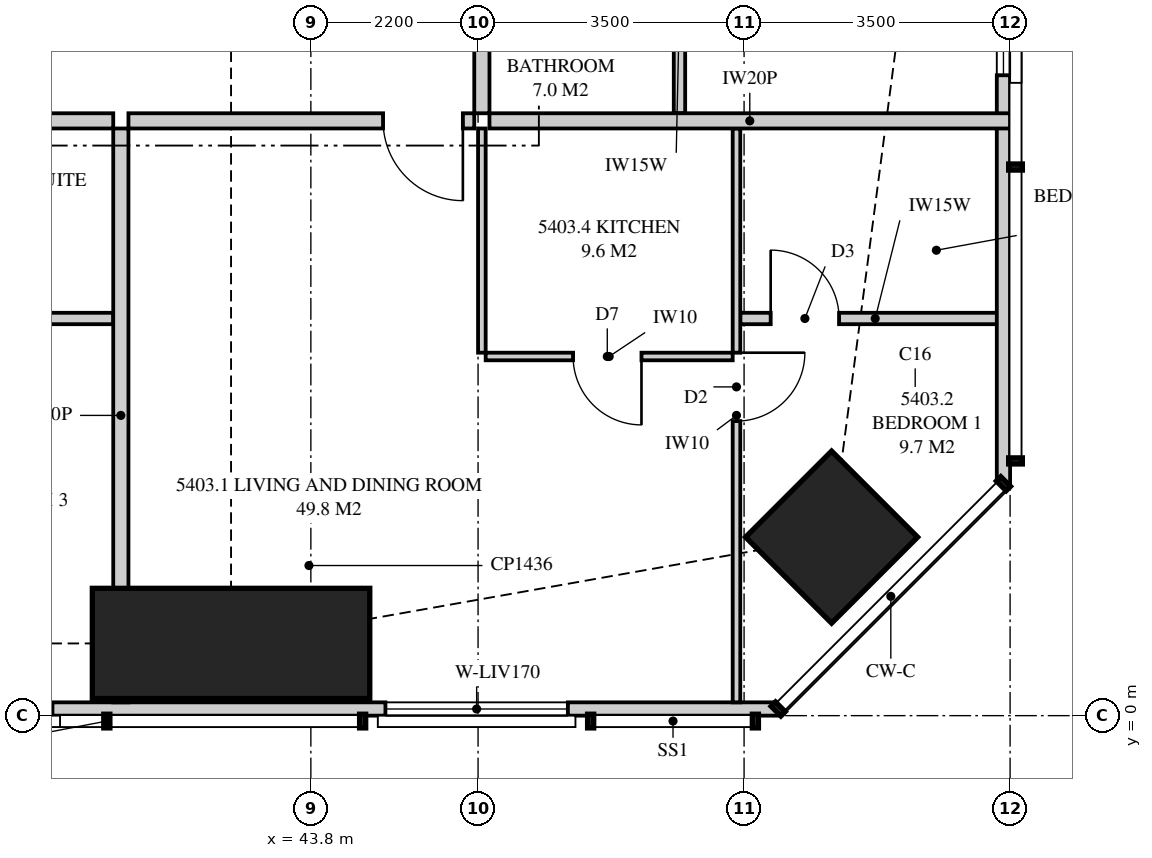
"""IFC4 building model, lengths in metres.
Left out: names, types, materials, properties, quantities, classifications, styles, units other than length and angle.
Written with IfcOpenShell. Run it as: python <this file> out.ifc"""

import sys

from ifc_helpers import new_model, si_unit, direction, frame, frame_2d, origin, origin_2d, place, context, subcontext, project, spatial, polyline, rectangle, outline, extrude, element, fill, save


model = new_model("IFC4")
c1 = context("Model", 3, precision=1e-05, world=origin(), true_north=direction((0.0, 1.0)))
c2 = subcontext(c1, "Body", "Model", "MODEL_VIEW")
j1 = project(units=[si_unit("LENGTHUNIT", "METRE"), si_unit("PLANEANGLEUNIT", "RADIAN")], contexts=[c1])
p1 = place(None, origin())
s1 = spatial("IfcSite", under=j1, at=p1, CompositionType="ELEMENT")
p2 = place(p1, origin())
s2 = spatial("IfcBuilding", under=s1, at=p2, CompositionType="ELEMENT")
p3 = place(p2, frame((0.0, 0.0, 197.9)))
s3 = spatial("IfcBuildingStorey", under=s2, at=p3, CompositionType="ELEMENT", Elevation=197.9)
p4 = place(p3, frame((42.75, 0.95, 0.0), z_axis=(0.0, 0.0, 1.0), x_axis=(0.0, 1.0, 0.0)))
e1 = element("IfcColumn", 1, at=p4, inside=s3, PredefinedType="COLUMN", context=c2, shape_type="SweptSolid", body=[
    extrude(rectangle(XDim=1.45, YDim=3.65, at=origin_2d()), origin(), (0.0, 0.0, 1.0), 3.35),
])
p5 = place(p3, frame((50.652, 2.348, 0.0), z_axis=(0.0, 0.0, 1.0), x_axis=(0.707106781187, 0.707106781187, 0.0)))
e2 = element("IfcColumn", 2, at=p5, inside=s3, PredefinedType="COLUMN", context=c2, shape_type="SweptSolid", body=[
    extrude(rectangle(XDim=1.6, YDim=1.6, at=origin_2d()), origin(), (0.0, 0.0, 1.0), 3.35),
])
p6 = place(p3, frame((15.051, 0.087, 0.0), z_axis=(0.0, 0.0, 1.0), x_axis=(1.0, 0.0, 0.0)))
e3 = element("IfcWall", 3, at=p6, inside=s3, PredefinedType="SOLIDWALL", context=c2, shape_type="SweptSolid", body=[
    extrude(outline(polyline([(0.0, 0.0), (34.897, 0.0), (34.897, 3.11), (27.91, 3.11), (27.91, 2.15), (27.836, 2.15), (27.836, 3.11), (27.699, 3.11), (27.699, 2.15), (7.199, 2.15), (7.199, 3.11), (7.062, 3.11), (7.062, 2.15), (6.987, 2.15), (6.987, 3.11), (0.0, 3.11), (0.0, 0.0)])), frame((0.0, 0.087, 0.0), z_axis=(0.0, -1.0, 0.0), x_axis=(1.0, 0.0, 0.0)), (0.0, 0.0, 1.0), 0.175),
])
p7 = place(p6, frame((0.613, 0.0, 0.4)))
e4 = element("IfcOpeningElement", 4, at=p7, cuts=e3, PredefinedType="OPENING", context=c2, shape_type="SweptSolid", body=[
    extrude(rectangle(XDim=1.2, YDim=1.7, at=frame_2d((0.6, 0.85))), frame((0.0, 0.097, 0.0), z_axis=(0.0, -1.0, 0.0), x_axis=(1.0, 0.0, 0.0)), (0.0, 0.0, 1.0), 0.195),
])
p8 = place(p6, frame((3.349, 0.0, 0.4)))
e5 = element("IfcOpeningElement", 5, at=p8, cuts=e3, PredefinedType="OPENING", context=c2, shape_type="SweptSolid", body=[
    extrude(rectangle(XDim=1.8, YDim=1.7, at=frame_2d((0.9, 0.85))), frame((0.0, 0.097, 0.0), z_axis=(0.0, -1.0, 0.0), x_axis=(1.0, 0.0, 0.0)), (0.0, 0.0, 1.0), 0.195),
])
p9 = place(p6, frame((9.13, 0.0, 0.4)))
e6 = element("IfcOpeningElement", 6, at=p9, cuts=e3, PredefinedType="OPENING", context=c2, shape_type="SweptSolid", body=[
    extrude(rectangle(XDim=1.8, YDim=1.7, at=frame_2d((0.9, 0.85))), frame((0.0, 0.097, 0.0), z_axis=(0.0, -1.0, 0.0), x_axis=(1.0, 0.0, 0.0)), (0.0, 0.0, 1.0), 0.195),
])
p10 = place(p6, frame((13.561, 0.0, 0.0)))
e7 = element("IfcOpeningElement", 7, at=p10, cuts=e3, PredefinedType="OPENING", context=c2, shape_type="SweptSolid", body=[
    extrude(rectangle(XDim=1.8, YDim=2.1, at=frame_2d((0.9, 1.05))), frame((0.0, 0.097, 0.0), z_axis=(0.0, -1.0, 0.0), x_axis=(1.0, 0.0, 0.0)), (0.0, 0.0, 1.0), 0.195),
])
p11 = place(p6, frame((11.799, 0.0, 0.4)))
e8 = element("IfcOpeningElement", 8, at=p11, cuts=e3, PredefinedType="OPENING", context=c2, shape_type="SweptSolid", body=[
    extrude(rectangle(XDim=1.2, YDim=1.7, at=frame_2d((0.6, 0.85))), frame((0.0, 0.097, 0.0), z_axis=(0.0, -1.0, 0.0), x_axis=(1.0, 0.0, 0.0)), (0.0, 0.0, 1.0), 0.195),
])
p12 = place(p6, frame((19.949, 0.0, 0.4)))
e9 = element("IfcOpeningElement", 9, at=p12, cuts=e3, PredefinedType="OPENING", context=c2, shape_type="SweptSolid", body=[
    extrude(rectangle(XDim=1.8, YDim=1.7, at=frame_2d((0.9, 0.85))), frame((0.0, 0.097, 0.0), z_axis=(0.0, -1.0, 0.0), x_axis=(1.0, 0.0, 0.0)), (0.0, 0.0, 1.0), 0.195),
])
p13 = place(p6, frame((23.549, 0.0, 0.4)))
e10 = element("IfcOpeningElement", 10, at=p13, cuts=e3, PredefinedType="OPENING", context=c2, shape_type="SweptSolid", body=[
    extrude(rectangle(XDim=1.8, YDim=1.7, at=frame_2d((0.9, 0.85))), frame((0.0, 0.097, 0.0), z_axis=(0.0, -1.0, 0.0), x_axis=(1.0, 0.0, 0.0)), (0.0, 0.0, 1.0), 0.195),
])
p14 = place(p6, frame((29.73, 0.0, 0.4)))
e11 = element("IfcOpeningElement", 11, at=p14, cuts=e3, PredefinedType="OPENING", context=c2, shape_type="SweptSolid", body=[
    extrude(rectangle(XDim=2.4, YDim=1.7, at=frame_2d((1.2, 0.85))), frame((0.0, 0.097, 0.0), z_axis=(0.0, -1.0, 0.0), x_axis=(1.0, 0.0, 0.0)), (0.0, 0.0, 1.0), 0.195),
])
p15 = place(p3, frame((52.913, 3.051, 0.0), z_axis=(0.0, 0.0, 1.0), x_axis=(0.0, 1.0, 0.0)))
e12 = element("IfcWall", 12, at=p15, inside=s3, PredefinedType="SOLIDWALL", context=c2, shape_type="SweptSolid", body=[
    extrude(outline(polyline([(0.0, 0.0), (29.897, 0.0), (29.897, 3.11), (22.167, 3.11), (22.167, 2.15), (22.074, 2.15), (22.074, 3.11), (21.949, 3.11), (21.949, 2.15), (9.949, 2.15), (9.949, 3.11), (9.847, 3.11), (9.847, 2.15), (9.706, 2.15), (9.706, 3.11), (0.0, 3.11), (0.0, 0.0)])), frame((0.0, 0.087, 0.0), z_axis=(0.0, -1.0, 0.0), x_axis=(1.0, 0.0, 0.0)), (0.0, 0.0, 1.0), 0.175),
])
p16 = place(p15, frame((5.374, 0.0, 0.4)))
e13 = element("IfcOpeningElement", 13, at=p16, cuts=e12, PredefinedType="OPENING", context=c2, shape_type="SweptSolid", body=[
    extrude(rectangle(XDim=1.8, YDim=1.7, at=frame_2d((0.9, 0.85))), frame((0.0, 0.097, 0.0), z_axis=(0.0, -1.0, 0.0), x_axis=(1.0, 0.0, 0.0)), (0.0, 0.0, 1.0), 0.195),
])
p17 = place(p15, frame((12.199, 0.0, 0.4)))
e14 = element("IfcOpeningElement", 14, at=p17, cuts=e12, PredefinedType="OPENING", context=c2, shape_type="SweptSolid", body=[
    extrude(rectangle(XDim=1.8, YDim=1.7, at=frame_2d((0.9, 0.85))), frame((0.0, 0.097, 0.0), z_axis=(0.0, -1.0, 0.0), x_axis=(1.0, 0.0, 0.0)), (0.0, 0.0, 1.0), 0.195),
])
p18 = place(p15, frame((15.324, 0.0, 0.0)))
e15 = element("IfcOpeningElement", 15, at=p18, cuts=e12, PredefinedType="OPENING", context=c2, shape_type="SweptSolid", body=[
    extrude(rectangle(XDim=1.8, YDim=2.1, at=frame_2d((0.9, 1.05))), frame((0.0, 0.097, 0.0), z_axis=(0.0, -1.0, 0.0), x_axis=(1.0, 0.0, 0.0)), (0.0, 0.0, 1.0), 0.195),
])
p19 = place(p15, frame((18.174, 0.0, 0.4)))
e16 = element("IfcOpeningElement", 16, at=p19, cuts=e12, PredefinedType="OPENING", context=c2, shape_type="SweptSolid", body=[
    extrude(rectangle(XDim=1.8, YDim=1.7, at=frame_2d((0.9, 0.85))), frame((0.0, 0.097, 0.0), z_axis=(0.0, -1.0, 0.0), x_axis=(1.0, 0.0, 0.0)), (0.0, 0.0, 1.0), 0.195),
])
p20 = place(p15, frame((23.886, 0.0, 0.4)))
e17 = element("IfcOpeningElement", 17, at=p20, cuts=e12, PredefinedType="OPENING", context=c2, shape_type="SweptSolid", body=[
    extrude(rectangle(XDim=1.8, YDim=1.7, at=frame_2d((0.9, 0.85))), frame((0.0, 0.097, 0.0), z_axis=(0.0, -1.0, 0.0), x_axis=(1.0, 0.0, 0.0)), (0.0, 0.0, 1.0), 0.195),
])
p21 = place(p15, frame((26.871, 0.0, 0.4)))
e18 = element("IfcOpeningElement", 18, at=p21, cuts=e12, PredefinedType="OPENING", context=c2, shape_type="SweptSolid", body=[
    extrude(rectangle(XDim=1.8, YDim=1.7, at=frame_2d((0.9, 0.85))), frame((0.0, 0.097, 0.0), z_axis=(0.0, -1.0, 0.0), x_axis=(1.0, 0.0, 0.0)), (0.0, 0.0, 1.0), 0.195),
])
p22 = place(p3, frame((41.3, 0.175, 0.0), z_axis=(0.0, 0.0, 1.0), x_axis=(0.0, 1.0, 0.0)))
e19 = element("IfcWall", 19, at=p22, inside=s3, PredefinedType="PARTITIONING", context=c2, shape_type="SweptSolid", body=[
    extrude(outline(polyline([(0.529, 2.15), (0.0, 2.15), (0.0, 0.0), (0.529, 0.0), (0.529, 0.032), (1.021, 0.032), (1.021, 0.0), (7.55, 0.0), (7.55, 3.11), (1.685, 3.11), (1.685, 2.15), (1.021, 2.15), (1.021, 2.118), (0.529, 2.118), (0.529, 2.15)])), frame((0.0, 0.1, 0.0), z_axis=(0.0, -1.0, 0.0), x_axis=(1.0, 0.0, 0.0)), (0.0, 0.0, 1.0), 0.2),
])
p23 = place(p3, frame((37.75, 5.225, 0.0), z_axis=(0.0, 0.0, 1.0), x_axis=(1.0, 0.0, 0.0)))
e20 = element("IfcWall", 20, at=p23, inside=s3, PredefinedType="PLUMBINGWALL", context=c2, shape_type="SweptSolid", body=[
    extrude(rectangle(XDim=3.45, YDim=0.15, at=frame_2d((1.725, 0.0))), origin(), (0.0, 0.0, 1.0), 3.11),
])
p24 = place(p23, frame((0.4, 0.0, 0.0)))
e21 = element("IfcOpeningElement", 21, at=p24, cuts=e20, PredefinedType="OPENING", context=c2, shape_type="SweptSolid", body=[
    extrude(rectangle(XDim=0.9, YDim=2.1, at=frame_2d((0.45, 1.05))), frame((0.0, 0.085, 0.0), z_axis=(0.0, -1.0, 0.0), x_axis=(1.0, 0.0, 0.0)), (0.0, 0.0, 1.0), 0.17),
])
p25 = place(p3, frame((41.4, 7.825, 0.0), z_axis=(0.0, 0.0, 1.0), x_axis=(1.0, 0.0, 0.0)))
e22 = element("IfcWall", 22, at=p25, inside=s3, PredefinedType="PARTITIONING", context=c2, shape_type="SweptSolid", body=[
    extrude(outline(polyline([(0.0, 0.0), (4.55, 0.0), (4.55, 3.11), (1.688, 3.11), (1.688, 2.541), (1.013, 2.541), (1.013, 3.11), (0.0, 3.11), (0.0, 0.0)])), frame((0.0, 0.1, 0.0), z_axis=(0.0, -1.0, 0.0), x_axis=(1.0, 0.0, 0.0)), (0.0, 0.0, 1.0), 0.2),
])
p26 = place(p25, frame((3.35, 0.0, 0.0)))
e23 = element("IfcOpeningElement", 23, at=p26, cuts=e22, PredefinedType="OPENING", context=c2, shape_type="SweptSolid", body=[
    extrude(rectangle(XDim=1.05, YDim=2.2, at=frame_2d((0.525, 1.1))), frame((0.0, 0.11, 0.0), z_axis=(0.0, -1.0, 0.0), x_axis=(1.0, 0.0, 0.0)), (0.0, 0.0, 1.0), 0.22),
])
p27 = place(p3, frame((49.4, 0.175, 0.0), z_axis=(0.0, 0.0, 1.0), x_axis=(0.0, 1.0, 0.0)))
e24 = element("IfcWall", 24, at=p27, inside=s3, PredefinedType="PARTITIONING", context=c2, shape_type="SweptSolid", body=[
    extrude(outline(polyline([(0.0, 0.0), (7.55, 0.0), (7.55, 3.11), (2.825, 3.11), (2.825, 2.15), (1.079, 2.15), (1.079, 3.11), (0.0, 3.11), (0.0, 0.0)])), frame((0.0, 0.05, 0.0), z_axis=(0.0, -1.0, 0.0), x_axis=(1.0, 0.0, 0.0)), (0.0, 0.0, 1.0), 0.1),
])
p28 = place(p27, frame((3.7, 0.0, 0.0)))
e25 = element("IfcOpeningElement", 25, at=p28, cuts=e24, PredefinedType="OPENING", context=c2, shape_type="SweptSolid", body=[
    extrude(rectangle(XDim=0.9, YDim=2.1, at=frame_2d((0.45, 1.05))), frame((0.0, 0.06, 0.0), z_axis=(0.0, -1.0, 0.0), x_axis=(1.0, 0.0, 0.0)), (0.0, 0.0, 1.0), 0.12),
])
p29 = place(p3, frame((49.45, 5.225, 0.0), z_axis=(0.0, 0.0, 1.0), x_axis=(1.0, 0.0, 0.0)))
e26 = element("IfcWall", 26, at=p29, inside=s3, PredefinedType="PLUMBINGWALL", context=c2, shape_type="SweptSolid", body=[
    extrude(outline(polyline([(0.0, 0.0), (3.55, 0.0), (3.55, 3.11), (2.472, 3.11), (2.472, 2.15), (0.687, 2.15), (0.687, 3.11), (0.0, 3.11), (0.0, 0.0)])), frame((0.0, 0.075, 0.0), z_axis=(0.0, -1.0, 0.0), x_axis=(1.0, 0.0, 0.0)), (0.0, 0.0, 1.0), 0.15),
])
p30 = place(p29, frame((0.4, 0.0, 0.0)))
e27 = element("IfcOpeningElement", 27, at=p30, cuts=e26, PredefinedType="OPENING", context=c2, shape_type="SweptSolid", body=[
    extrude(rectangle(XDim=0.9, YDim=2.1, at=frame_2d((0.45, 1.05))), frame((0.0, 0.085, 0.0), z_axis=(0.0, -1.0, 0.0), x_axis=(1.0, 0.0, 0.0)), (0.0, 0.0, 1.0), 0.17),
])
p31 = place(p3, frame((46.1, 4.725, 0.0), z_axis=(0.0, 0.0, 1.0), x_axis=(1.0, 0.0, 0.0)))
e28 = element("IfcWall", 28, at=p31, inside=s3, PredefinedType="PARTITIONING", context=c2, shape_type="SweptSolid", body=[
    extrude(rectangle(XDim=3.25, YDim=0.1, at=frame_2d((1.625, 0.0))), origin(), (0.0, 0.0, 1.0), 3.11),
])
p32 = place(p31, frame((1.15, 0.0, 0.0)))
e29 = element("IfcOpeningElement", 29, at=p32, cuts=e28, PredefinedType="OPENING", context=c2, shape_type="SweptSolid", body=[
    extrude(rectangle(XDim=0.9, YDim=2.1, at=frame_2d((0.45, 1.05))), frame((0.0, 0.06, 0.0), z_axis=(0.0, -1.0, 0.0), x_axis=(1.0, 0.0, 0.0)), (0.0, 0.0, 1.0), 0.12),
])
p33 = place(p3, frame((46.05, 4.775, 0.0), z_axis=(0.0, 0.0, 1.0), x_axis=(0.0, 1.0, 0.0)))
e30 = element("IfcWall", 30, at=p33, inside=s3, PredefinedType="PARTITIONING", context=c2, shape_type="SweptSolid", body=[
    extrude(rectangle(XDim=2.95, YDim=0.1, at=frame_2d((1.475, 0.0))), origin(), (0.0, 0.0, 1.0), 3.11),
])
p34 = place(p3, frame((46.15, 7.825, 0.0), z_axis=(0.0, 0.0, 1.0), x_axis=(1.0, 0.0, 0.0)))
e31 = element("IfcWall", 31, at=p34, inside=s3, PredefinedType="PARTITIONING", context=c2, shape_type="SweptSolid", body=[
    extrude(outline(polyline([(0.0, 0.0), (6.85, 0.0), (6.85, 3.11), (6.138, 3.11), (6.138, 2.15), (4.303, 2.15), (4.303, 3.11), (0.0, 3.11), (0.0, 0.0)])), frame((0.0, 0.1, 0.0), z_axis=(0.0, -1.0, 0.0), x_axis=(1.0, 0.0, 0.0)), (0.0, 0.0, 1.0), 0.2),
])
p35 = place(p3, frame((46.05, 7.925, 0.0), z_axis=(0.0, 0.0, 1.0), x_axis=(0.0, 1.0, 0.0)))
e32 = element("IfcWall", 32, at=p35, inside=s3, PredefinedType="PARTITIONING", context=c2, shape_type="SweptSolid", body=[
    extrude(outline(polyline([(0.0, 0.0), (21.15, 0.0), (21.15, 3.11), (17.412, 3.11), (17.412, 2.541), (16.738, 2.541), (16.738, 3.11), (5.412, 3.11), (5.412, 2.541), (4.738, 2.541), (4.738, 3.11), (0.0, 3.11), (0.0, 0.0)])), frame((0.0, 0.1, 0.0), z_axis=(0.0, -1.0, 0.0), x_axis=(1.0, 0.0, 0.0)), (0.0, 0.0, 1.0), 0.2),
])
p36 = place(p35, frame((10.075, 0.0, 0.0)))
e33 = element("IfcOpeningElement", 33, at=p36, cuts=e32, PredefinedType="OPENING", context=c2, shape_type="SweptSolid", body=[
    extrude(rectangle(XDim=1.05, YDim=2.2, at=frame_2d((0.525, 1.1))), frame((0.0, 0.11, 0.0), z_axis=(0.0, -1.0, 0.0), x_axis=(1.0, 0.0, 0.0)), (0.0, 0.0, 1.0), 0.22),
])
p37 = place(p3, frame((48.65, 7.925, 0.0), z_axis=(0.0, 0.0, 1.0), x_axis=(0.0, 1.0, 0.0)))
e34 = element("IfcWall", 34, at=p37, inside=s3, PredefinedType="PLUMBINGWALL", context=c2, shape_type="SweptSolid", body=[
    extrude(rectangle(XDim=2.85, YDim=0.15, at=frame_2d((1.425, 0.0))), origin(), (0.0, 0.0, 1.0), 3.11),
])
p38 = place(p37, frame((1.55, 0.0, 0.0)))
e35 = element("IfcOpeningElement", 35, at=p38, cuts=e34, PredefinedType="OPENING", context=c2, shape_type="SweptSolid", body=[
    extrude(rectangle(XDim=0.9, YDim=2.1, at=frame_2d((0.45, 1.05))), frame((0.0, 0.085, 0.0), z_axis=(0.0, -1.0, 0.0), x_axis=(1.0, 0.0, 0.0)), (0.0, 0.0, 1.0), 0.17),
])
p39 = place(p3, frame((32.6, 7.825, 0.0), z_axis=(0.0, 0.0, 1.0), x_axis=(1.0, 0.0, 0.0)))
e36 = element("IfcWall", 36, at=p39, inside=s3, PredefinedType="PARTITIONING", context=c2, shape_type="SweptSolid", body=[
    extrude(outline(polyline([(0.0, 0.0), (8.6, 0.0), (8.6, 3.11), (0.237, 3.11), (0.237, 2.541), (0.0, 2.541), (0.0, 3.11), (0.0, 0.0)])), frame((0.0, 0.1, 0.0), z_axis=(0.0, -1.0, 0.0), x_axis=(1.0, 0.0, 0.0)), (0.0, 0.0, 1.0), 0.2),
])
p40 = place(p14, origin())
e37 = element("IfcWindow", 37, at=p40, inside=s3, PartitioningType="SINGLE_PANEL", PredefinedType="WINDOW", context=c2, shape_type="SweptSolid", body=[
    extrude(rectangle(XDim=2.4, YDim=1.7, at=frame_2d((1.2, 0.85))), frame((0.0, 0.03, 0.0), z_axis=(0.0, -1.0, 0.0), x_axis=(1.0, 0.0, 0.0)), (0.0, 0.0, 1.0), 0.06),
])
fill(e11, e37)
p41 = place(p16, origin())
e38 = element("IfcWindow", 38, at=p41, inside=s3, PartitioningType="SINGLE_PANEL", PredefinedType="WINDOW", context=c2, shape_type="SweptSolid", body=[
    extrude(rectangle(XDim=1.8, YDim=1.7, at=frame_2d((0.9, 0.85))), frame((0.0, 0.03, 0.0), z_axis=(0.0, -1.0, 0.0), x_axis=(1.0, 0.0, 0.0)), (0.0, 0.0, 1.0), 0.06),
])
fill(e13, e38)
p42 = place(p26, frame((1.05, 0.0, 0.0), z_axis=(0.0, 0.0, 1.0), x_axis=(-1.0, 0.0, 0.0)))
e39 = element("IfcDoor", 39, at=p42, inside=s3, OperationType="SINGLE_SWING_LEFT", PredefinedType="DOOR", context=c2, shape_type="SweptSolid", body=[
    extrude(rectangle(XDim=1.05, YDim=2.2, at=frame_2d((0.525, 1.1))), frame((0.0, 0.025, 0.0), z_axis=(0.0, -1.0, 0.0), x_axis=(1.0, 0.0, 0.0)), (0.0, 0.0, 1.0), 0.05),
])
fill(e23, e39)
p43 = place(p28, frame((0.9, 0.0, 0.0), z_axis=(0.0, 0.0, 1.0), x_axis=(-1.0, 0.0, 0.0)))
e40 = element("IfcDoor", 40, at=p43, inside=s3, OperationType="SINGLE_SWING_LEFT", PredefinedType="DOOR", context=c2, shape_type="SweptSolid", body=[
    extrude(rectangle(XDim=0.9, YDim=2.1, at=frame_2d((0.45, 1.05))), frame((0.0, 0.025, 0.0), z_axis=(0.0, -1.0, 0.0), x_axis=(1.0, 0.0, 0.0)), (0.0, 0.0, 1.0), 0.05),
])
fill(e25, e40)
p44 = place(p30, origin())
e41 = element("IfcDoor", 41, at=p44, inside=s3, OperationType="SINGLE_SWING_LEFT", PredefinedType="DOOR", context=c2, shape_type="SweptSolid", body=[
    extrude(rectangle(XDim=0.9, YDim=2.1, at=frame_2d((0.45, 1.05))), frame((0.0, 0.025, 0.0), z_axis=(0.0, -1.0, 0.0), x_axis=(1.0, 0.0, 0.0)), (0.0, 0.0, 1.0), 0.05),
])
fill(e27, e41)
p45 = place(p32, frame((0.9, 0.0, 0.0), z_axis=(0.0, 0.0, 1.0), x_axis=(-1.0, 0.0, 0.0)))
e42 = element("IfcDoor", 42, at=p45, inside=s3, OperationType="SINGLE_SWING_LEFT", PredefinedType="DOOR", context=c2, shape_type="SweptSolid", body=[
    extrude(rectangle(XDim=0.9, YDim=2.1, at=frame_2d((0.45, 1.05))), frame((0.0, 0.025, 0.0), z_axis=(0.0, -1.0, 0.0), x_axis=(1.0, 0.0, 0.0)), (0.0, 0.0, 1.0), 0.05),
])
fill(e29, e42)
save(model, sys.argv[1])
